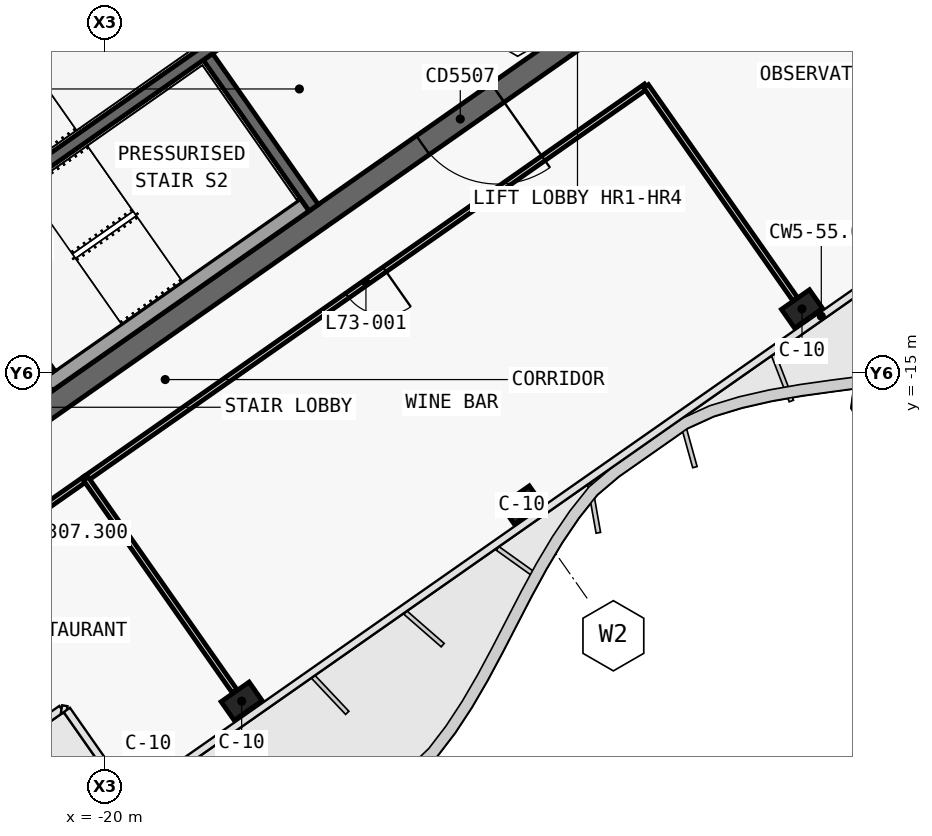
"""IFC4 building model, lengths in metres.
Left out: names, types, materials, properties, quantities, classifications, styles, units other than length and angle.
Written with IfcOpenShell. Run it as: python <this file> out.ifc"""

import sys

from ifc_helpers import new_model, si_unit, direction, frame, frame_2d, origin, origin_2d, place, context, subcontext, project, spatial, polyline, rectangle, outline, extrude, element, fill, save


model = new_model("IFC4")
c1 = context("Model", 3, precision=1e-05, world=origin(), true_north=direction((0.0, 1.0)))
c2 = subcontext(c1, "Body", "Model", "MODEL_VIEW")
j1 = project(units=[si_unit("LENGTHUNIT", "METRE"), si_unit("PLANEANGLEUNIT", "RADIAN")], contexts=[c1])
p1 = place(None, origin())
s1 = spatial("IfcSite", under=j1, at=p1, CompositionType="ELEMENT")
p2 = place(p1, origin())
s2 = spatial("IfcBuilding", under=s1, at=p2, CompositionType="ELEMENT")
p3 = place(p2, frame((0.0, 0.0, 307.3)))
s3 = spatial("IfcBuildingStorey", under=s2, at=p3, CompositionType="ELEMENT", Elevation=307.3)
p4 = place(p3, frame((-0.028, 12.066, 0.0), z_axis=(0.0, 0.0, 1.0), x_axis=(-0.819151382952, -0.573577380837, 0.0)))
e1 = element("IfcWall", 1, at=p4, inside=s3, PredefinedType="SHEAR", context=c2, shape_type="SweptSolid", body=[
    extrude(outline(polyline([(33.898, 0.3), (0.42, 0.3), (0.0, -0.3), (33.898, -0.3), (33.898, 0.3)])), origin(), (0.0, 0.0, 1.0), 6.0),
])
p5 = place(p3, frame((-0.028, -0.874, 0.0), z_axis=(0.0, 0.0, 1.0), x_axis=(-0.819150035022, -0.573579305871, 0.0)))
e2 = element("IfcWall", 2, at=p5, inside=s3, PredefinedType="SHEAR", context=c2, shape_type="SweptSolid", body=[
    extrude(outline(polyline([(26.476, 0.3), (0.42, 0.3), (0.0, -0.3), (26.476, -0.3), (26.476, 0.3)])), origin(), (0.0, 0.0, 1.0), 6.0),
])
p6 = place(p5, frame((2.976, 0.0, 0.0)))
e3 = element("IfcOpeningElement", 3, at=p6, cuts=e2, PredefinedType="OPENING", context=c2, shape_type="SweptSolid", body=[
    extrude(rectangle(XDim=2.4, YDim=2.1, at=frame_2d((1.2, 1.05))), frame((0.0, 0.31, 0.0), z_axis=(0.0, -1.0, 0.0), x_axis=(1.0, 0.0, 0.0)), (0.0, 0.0, 1.0), 0.62),
])
p7 = place(p5, frame((11.776, 0.0, 0.0)))
e4 = element("IfcOpeningElement", 4, at=p7, cuts=e2, PredefinedType="OPENING", context=c2, shape_type="SweptSolid", body=[
    extrude(rectangle(XDim=2.4, YDim=2.1, at=frame_2d((1.2, 1.05))), frame((0.0, 0.31, 0.0), z_axis=(0.0, -1.0, 0.0), x_axis=(1.0, 0.0, 0.0)), (0.0, 0.0, 1.0), 0.62),
])
p8 = place(p3, frame((-21.642, -15.642, 0.0), z_axis=(0.0, 0.0, 1.0), x_axis=(-0.573586866468, 0.819144740944, 0.0)))
e5 = element("IfcWall", 5, at=p8, inside=s3, PredefinedType="SHEAR", context=c2, shape_type="SweptSolid", body=[
    extrude(outline(polyline([(0.0, 0.3), (0.0, -0.3), (10.0, -0.3), (10.0, 0.3), (0.0, 0.3)])), origin(), (0.0, 0.0, 1.0), 6.0),
])
p9 = place(p8, frame((6.5, 0.0, 0.0)))
e6 = element("IfcOpeningElement", 6, at=p9, cuts=e5, PredefinedType="OPENING", context=c2, shape_type="SweptSolid", body=[
    extrude(rectangle(XDim=1.8, YDim=2.1, at=frame_2d((0.9, 1.05))), frame((0.0, 0.31, 0.0), z_axis=(0.0, -1.0, 0.0), x_axis=(1.0, 0.0, 0.0)), (0.0, 0.0, 1.0), 0.62),
])
p10 = place(p8, frame((2.3, 0.0, 0.0)))
e7 = element("IfcOpeningElement", 7, at=p10, cuts=e5, PredefinedType="OPENING", context=c2, shape_type="SweptSolid", body=[
    extrude(rectangle(XDim=1.8, YDim=2.1, at=frame_2d((0.9, 1.05))), frame((0.0, 0.31, 0.0), z_axis=(0.0, -1.0, 0.0), x_axis=(1.0, 0.0, 0.0)), (0.0, 0.0, 1.0), 0.62),
])
p11 = place(p3, frame((-14.515, -10.652, 0.0), z_axis=(0.0, 0.0, 1.0), x_axis=(-0.573560315113, 0.819163332265, 0.0)))
e8 = element("IfcWall", 8, at=p11, inside=s3, PredefinedType="SHEAR", context=c2, shape_type="SweptSolid", body=[
    extrude(outline(polyline([(4.85, 0.15), (0.0, 0.15), (0.0, -0.15), (4.85, -0.15), (4.85, 0.15)])), origin(), (0.0, 0.0, 1.0), 6.0),
])
p12 = place(p3, frame((-2.638, 3.768, 0.0), z_axis=(0.0, 0.0, 1.0), x_axis=(-0.819155014212, -0.573572194837, 0.0)))
e9 = element("IfcWall", 9, at=p12, inside=s3, PredefinedType="SHEAR", context=c2, shape_type="SweptSolid", body=[
    extrude(outline(polyline([(26.4, 0.15), (0.0, 0.15), (0.0, -0.15), (26.4, -0.15), (26.4, 0.15)])), origin(), (0.0, 0.0, 1.0), 6.0),
])
p13 = place(p12, frame((1.169, 0.0, 0.0)))
e10 = element("IfcOpeningElement", 10, at=p13, cuts=e9, PredefinedType="OPENING", context=c2, shape_type="SweptSolid", body=[
    extrude(rectangle(XDim=1.1, YDim=2.1, at=frame_2d((0.55, 1.05))), frame((0.0, 0.16, 0.0), z_axis=(0.0, -1.0, 0.0), x_axis=(1.0, 0.0, 0.0)), (0.0, 0.0, 1.0), 0.32),
])
p14 = place(p12, frame((3.206, 0.0, 0.0)))
e11 = element("IfcOpeningElement", 11, at=p14, cuts=e9, PredefinedType="OPENING", context=c2, shape_type="SweptSolid", body=[
    extrude(rectangle(XDim=1.1, YDim=2.1, at=frame_2d((0.55, 1.05))), frame((0.0, 0.16, 0.0), z_axis=(0.0, -1.0, 0.0), x_axis=(1.0, 0.0, 0.0)), (0.0, 0.0, 1.0), 0.32),
])
p15 = place(p12, frame((5.244, 0.0, 0.0)))
e12 = element("IfcOpeningElement", 12, at=p15, cuts=e9, PredefinedType="OPENING", context=c2, shape_type="SweptSolid", body=[
    extrude(rectangle(XDim=1.1, YDim=2.1, at=frame_2d((0.55, 1.05))), frame((0.0, 0.16, 0.0), z_axis=(0.0, -1.0, 0.0), x_axis=(1.0, 0.0, 0.0)), (0.0, 0.0, 1.0), 0.32),
])
p16 = place(p12, frame((7.281, 0.0, 0.0)))
e13 = element("IfcOpeningElement", 13, at=p16, cuts=e9, PredefinedType="OPENING", context=c2, shape_type="SweptSolid", body=[
    extrude(rectangle(XDim=1.1, YDim=2.1, at=frame_2d((0.55, 1.05))), frame((0.0, 0.16, 0.0), z_axis=(0.0, -1.0, 0.0), x_axis=(1.0, 0.0, 0.0)), (0.0, 0.0, 1.0), 0.32),
])
p17 = place(p12, frame((9.688, 0.0, 0.0)))
e14 = element("IfcOpeningElement", 14, at=p17, cuts=e9, PredefinedType="OPENING", context=c2, shape_type="SweptSolid", body=[
    extrude(rectangle(XDim=1.1, YDim=2.1, at=frame_2d((0.55, 1.05))), frame((0.0, 0.16, 0.0), z_axis=(0.0, -1.0, 0.0), x_axis=(1.0, 0.0, 0.0)), (0.0, 0.0, 1.0), 0.32),
])
p18 = place(p12, frame((11.863, 0.0, 0.0)))
e15 = element("IfcOpeningElement", 15, at=p18, cuts=e9, PredefinedType="OPENING", context=c2, shape_type="SweptSolid", body=[
    extrude(rectangle(XDim=1.1, YDim=2.1, at=frame_2d((0.55, 1.05))), frame((0.0, 0.16, 0.0), z_axis=(0.0, -1.0, 0.0), x_axis=(1.0, 0.0, 0.0)), (0.0, 0.0, 1.0), 0.32),
])
p19 = place(p12, frame((15.175, 0.0, 0.0)))
e16 = element("IfcOpeningElement", 16, at=p19, cuts=e9, PredefinedType="OPENING", context=c2, shape_type="SweptSolid", body=[
    extrude(rectangle(XDim=1.0, YDim=2.1, at=frame_2d((0.5, 1.05))), frame((0.0, 0.16, 0.0), z_axis=(0.0, -1.0, 0.0), x_axis=(1.0, 0.0, 0.0)), (0.0, 0.0, 1.0), 0.32),
])
for number, where, z_axis, x_axis in (
    (17, (-1.665, -13.313, 0.0), (0.0, 0.0, 1.0), (-0.819, -0.574, 0.0)),
    (18, (-9.038, -18.475, 0.0), (0.0, 0.0, 1.0), (-0.819, -0.574, 0.0)),
    (19, (-16.41, -23.637, 0.0), (0.0, 0.0, 1.0), (-0.819, -0.574, 0.0)),
    (20, (-18.867, -25.358, 0.0), (0.0, 0.0, 1.0), (-0.819, -0.574, 0.0)),
):
    element("IfcColumn", number, at=place(p3, frame(where, z_axis=z_axis, x_axis=x_axis)), inside=s3, PredefinedType="COLUMN", context=c2, shape_type="SweptSolid", body=[
        extrude(rectangle(XDim=0.9, YDim=0.6, at=origin_2d()), origin(), (0.0, 0.0, 1.0), 6.0),
    ])
p20 = place(p3, frame((-20.259, -2.71, 0.0), z_axis=(0.0, 0.0, 1.0), x_axis=(-0.81914849389, -0.573581506813, 0.0)))
e21 = element("IfcWall", 21, at=p20, inside=s3, PredefinedType="SOLIDWALL", context=c2, shape_type="SweptSolid", body=[
    extrude(rectangle(XDim=8.25, YDim=0.4, at=frame_2d((4.125, 0.0))), origin(), (0.0, 0.0, 1.0), 5.72),
])
p21 = place(p3, frame((-14.753, -10.574, 0.0), z_axis=(0.0, 0.0, 1.0), x_axis=(-0.819158229677, -0.573567602601, 0.0)))
e22 = element("IfcWall", 22, at=p21, inside=s3, PredefinedType="SOLIDWALL", context=c2, shape_type="SweptSolid", body=[
    extrude(rectangle(XDim=8.25, YDim=0.4, at=frame_2d((4.125, 0.0))), origin(), (0.0, 0.0, 1.0), 5.72),
])
p22 = place(p3, frame((-21.462, -15.028, 0.0), z_axis=(0.0, 0.0, 1.0), x_axis=(-0.573559770908, 0.819163713305, 0.0)))
e23 = element("IfcWall", 23, at=p22, inside=s3, PredefinedType="SOLIDWALL", context=c2, shape_type="SweptSolid", body=[
    extrude(rectangle(XDim=1.85, YDim=0.4, at=frame_2d((0.925, 0.0))), origin(), (0.0, 0.0, 1.0), 5.72),
])
p23 = place(p3, frame((-5.766, -7.456, 0.0), z_axis=(0.0, 0.0, 1.0), x_axis=(-0.819153544995, -0.573574293115, 0.0)))
e24 = element("IfcWall", 24, at=p23, inside=s3, PredefinedType="PARTITIONING", context=c2, shape_type="SweptSolid", body=[
    extrude(rectangle(XDim=18.002, YDim=0.15, at=frame_2d((9.001, 0.0))), origin(), (0.0, 0.0, 1.0), 5.15),
])
p24 = place(p23, frame((8.401, 0.0, 0.0)))
e25 = element("IfcOpeningElement", 25, at=p24, cuts=e24, PredefinedType="OPENING", context=c2, shape_type="SweptSolid", body=[
    extrude(rectangle(XDim=1.2, YDim=2.4, at=frame_2d((0.6, 1.2))), frame((0.0, 0.085, 0.0), z_axis=(0.0, -1.0, 0.0), x_axis=(1.0, 0.0, 0.0)), (0.0, 0.0, 1.0), 0.17),
])
p25 = place(p3, frame((-20.51, -17.779, 0.0), z_axis=(0.0, 0.0, 1.0), x_axis=(-0.819154345195, -0.573573150303, 0.0)))
e26 = element("IfcWall", 26, at=p25, inside=s3, PredefinedType="PARTITIONING", context=c2, shape_type="SweptSolid", body=[
    extrude(rectangle(XDim=6.802, YDim=0.15, at=frame_2d((3.401, 0.0))), origin(), (0.0, 0.0, 1.0), 5.1),
])
p26 = place(p25, frame((2.801, 0.0, 0.0)))
e27 = element("IfcOpeningElement", 27, at=p26, cuts=e26, PredefinedType="OPENING", context=c2, shape_type="SweptSolid", body=[
    extrude(rectangle(XDim=1.2, YDim=2.4, at=frame_2d((0.6, 1.2))), frame((0.0, 0.085, 0.0), z_axis=(0.0, -1.0, 0.0), x_axis=(1.0, 0.0, 0.0)), (0.0, 0.0, 1.0), 0.17),
])
p27 = place(p3, frame((-1.849, -13.051, 0.0), z_axis=(0.0, 0.0, 1.0), x_axis=(-0.57357985571, 0.819149650018, 0.0)))
e28 = element("IfcWall", 28, at=p27, inside=s3, PredefinedType="PARTITIONING", context=c2, shape_type="SweptSolid", body=[
    extrude(rectangle(XDim=6.832, YDim=0.15, at=frame_2d((3.416, 0.0))), origin(), (0.0, 0.0, 1.0), 5.15),
])
p28 = place(p3, frame((-16.594, -23.375, 0.0), z_axis=(0.0, 0.0, 1.0), x_axis=(-0.573577493031, 0.819151304393, 0.0)))
e29 = element("IfcWall", 29, at=p28, inside=s3, PredefinedType="PARTITIONING", context=c2, shape_type="SweptSolid", body=[
    extrude(rectangle(XDim=6.83, YDim=0.15, at=frame_2d((3.415, 0.0))), origin(), (0.0, 0.0, 1.0), 5.15),
])
p29 = place(p7, origin())
e30 = element("IfcDoor", 30, at=p29, inside=s3, OperationType="DOUBLE_DOOR_SINGLE_SWING", PredefinedType="DOOR", context=c2, shape_type="SweptSolid", body=[
    extrude(rectangle(XDim=2.4, YDim=2.1, at=frame_2d((1.2, 1.05))), frame((0.0, 0.025, 0.0), z_axis=(0.0, -1.0, 0.0), x_axis=(1.0, 0.0, 0.0)), (0.0, 0.0, 1.0), 0.05),
])
fill(e4, e30)
p30 = place(p24, origin())
e31 = element("IfcDoor", 31, at=p30, inside=s3, OperationType="DOUBLE_DOOR_SINGLE_SWING", PredefinedType="DOOR", context=c2, shape_type="SweptSolid", body=[
    extrude(rectangle(XDim=1.2, YDim=2.4, at=frame_2d((0.6, 1.2))), frame((0.0, 0.025, 0.0), z_axis=(0.0, -1.0, 0.0), x_axis=(1.0, 0.0, 0.0)), (0.0, 0.0, 1.0), 0.05),
])
fill(e25, e31)
save(model, sys.argv[1])
